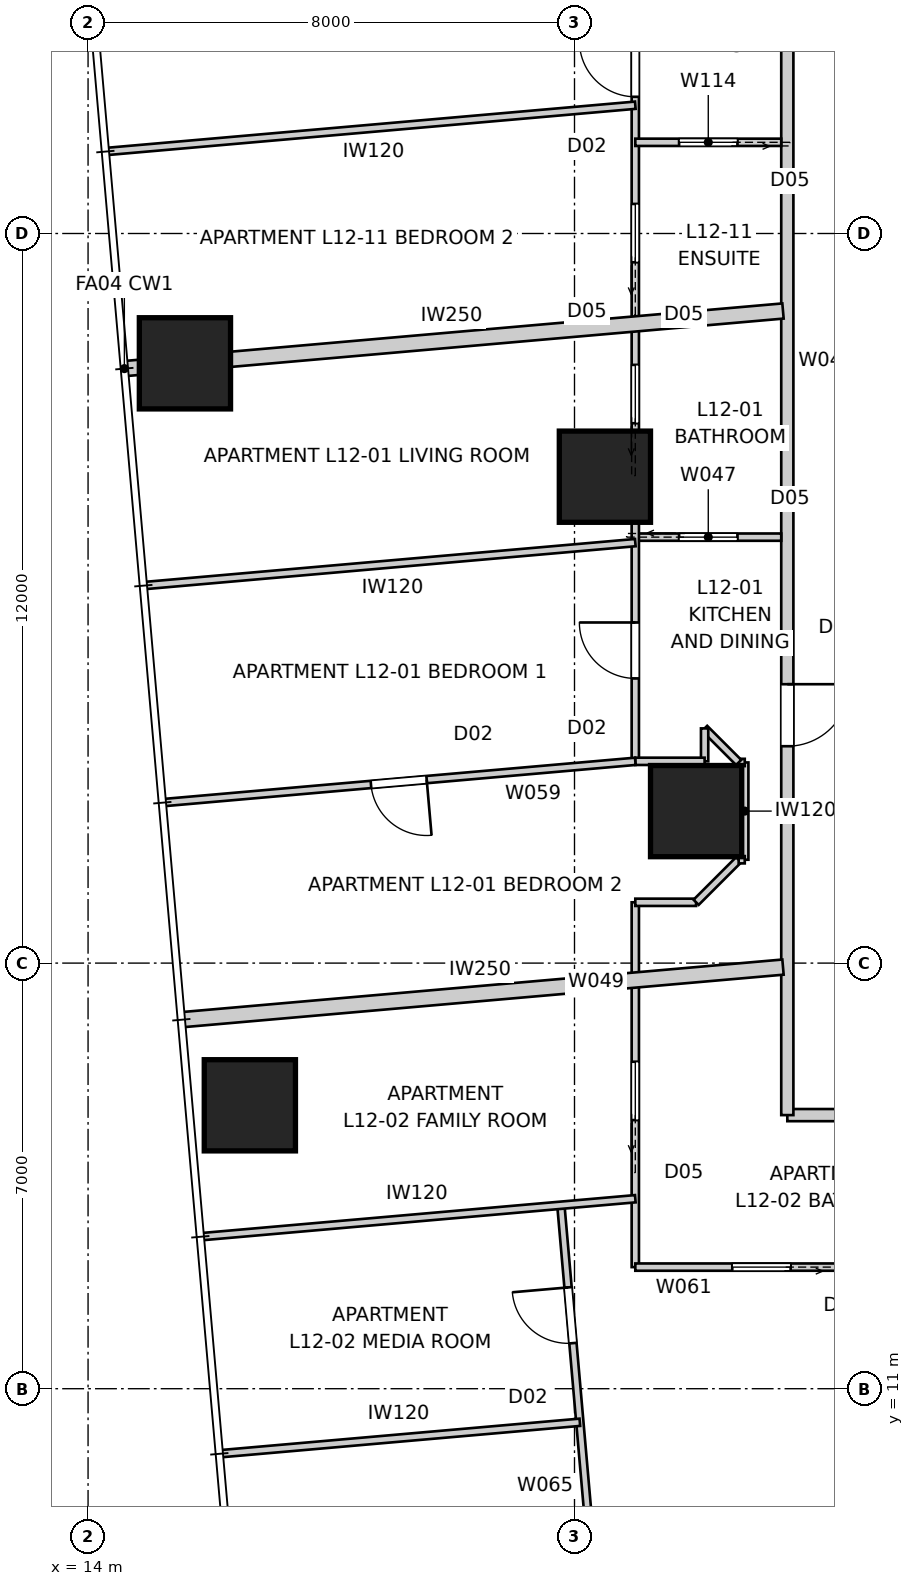
"""IFC4 building model, lengths in metres.
Left out: names, types, materials, properties, quantities, classifications, styles, units other than length and angle.
Written with IfcOpenShell. Run it as: python <this file> out.ifc"""

import sys

from ifc_helpers import new_model, si_unit, direction, frame, frame_2d, origin, origin_2d, place, context, subcontext, project, spatial, rectangle, extrude, element, fill, save


model = new_model("IFC4")
c1 = context("Model", 3, precision=1e-05, world=origin(), true_north=direction((0.0, 1.0)))
c2 = subcontext(c1, "Body", "Model", "MODEL_VIEW")
j1 = project(units=[si_unit("LENGTHUNIT", "METRE"), si_unit("PLANEANGLEUNIT", "RADIAN")], contexts=[c1])
p1 = place(None, origin())
s1 = spatial("IfcSite", under=j1, at=p1, CompositionType="ELEMENT")
p2 = place(p1, origin())
s2 = spatial("IfcBuilding", under=s1, at=p2, CompositionType="ELEMENT")
p3 = place(p2, frame((0.0, 0.0, 47.2)))
s3 = spatial("IfcBuildingStorey", under=s2, at=p3, CompositionType="ELEMENT", Elevation=47.2)
for number, where, z_axis, x_axis in (
    (1, (15.593, 27.865, -0.15), (0.0, 0.0, 1.0), (1.0, 0.0, 0.0)),
    (2, (16.661, 15.661, -0.15), (0.0, 0.0, 1.0), (1.0, 0.0, 0.0)),
):
    element("IfcColumn", number, at=place(p3, frame(where, z_axis=z_axis, x_axis=x_axis)), inside=s3, PredefinedType="COLUMN", context=c2, shape_type="SweptSolid", body=[
        extrude(rectangle(XDim=1.5, YDim=1.5, at=origin_2d()), origin(), (0.0, 0.0, 1.0), 3.55),
    ])
for number, where, z_axis, x_axis in (
    (3, (22.5, 26.0, 0.0), (0.0, 0.0, 1.0), (1.0, 0.0, 0.0)),
    (4, (24.0, 20.5, 0.0), (0.0, 0.0, 1.0), (1.0, 0.0, 0.0)),
):
    element("IfcColumn", number, at=place(p3, frame(where, z_axis=z_axis, x_axis=x_axis)), inside=s3, PredefinedType="COLUMN", context=c2, shape_type="SweptSolid", body=[
        extrude(rectangle(XDim=1.5, YDim=1.5, at=origin_2d()), origin(), (0.0, 0.0, 1.0), 3.4),
    ])
p4 = place(p3, frame((25.5, 15.5, 0.0), z_axis=(0.0, 0.0, 1.0), x_axis=(1.0, 0.0, 0.0)))
e5 = element("IfcWall", 5, at=p4, inside=s3, PredefinedType="PARTITIONING", context=c2, shape_type="SweptSolid", body=[
    extrude(rectangle(XDim=28.2, YDim=0.2, at=frame_2d((14.1, 0.0))), origin(), (0.0, 0.0, 1.0), 3.25),
])
p5 = place(p4, frame((19.123, 0.0, 0.0)))
e6 = element("IfcOpeningElement", 6, at=p5, cuts=e5, PredefinedType="OPENING", context=c2, shape_type="SweptSolid", body=[
    extrude(rectangle(XDim=1.02, YDim=2.34, at=frame_2d((0.51, 1.17))), frame((0.0, 0.11, 0.0), z_axis=(0.0, -1.0, 0.0), x_axis=(1.0, 0.0, 0.0)), (0.0, 0.0, 1.0), 0.22),
])
p6 = place(p4, frame((5.85, 0.0, 0.0)))
e7 = element("IfcOpeningElement", 7, at=p6, cuts=e5, PredefinedType="OPENING", context=c2, shape_type="SweptSolid", body=[
    extrude(rectangle(XDim=1.02, YDim=2.34, at=frame_2d((0.51, 1.17))), frame((0.0, 0.11, 0.0), z_axis=(0.0, -1.0, 0.0), x_axis=(1.0, 0.0, 0.0)), (0.0, 0.0, 1.0), 0.22),
])
p7 = place(p4, frame((24.892, 0.0, 0.0)))
e8 = element("IfcOpeningElement", 8, at=p7, cuts=e5, PredefinedType="OPENING", context=c2, shape_type="SweptSolid", body=[
    extrude(rectangle(XDim=1.02, YDim=2.1, at=frame_2d((0.51, 1.05))), frame((0.0, 0.11, 0.0), z_axis=(0.0, -1.0, 0.0), x_axis=(1.0, 0.0, 0.0)), (0.0, 0.0, 1.0), 0.22),
])
p8 = place(p3, frame((25.5, 43.7, 0.0), z_axis=(0.0, 0.0, 1.0), x_axis=(0.0, -1.0, 0.0)))
e9 = element("IfcWall", 9, at=p8, inside=s3, PredefinedType="PARTITIONING", context=c2, shape_type="SweptSolid", body=[
    extrude(rectangle(XDim=28.2, YDim=0.2, at=frame_2d((14.1, 0.0))), origin(), (0.0, 0.0, 1.0), 3.25),
])
p9 = place(p8, frame((21.113, 0.0, 0.0)))
e10 = element("IfcOpeningElement", 10, at=p9, cuts=e9, PredefinedType="OPENING", context=c2, shape_type="SweptSolid", body=[
    extrude(rectangle(XDim=1.02, YDim=2.34, at=frame_2d((0.51, 1.17))), frame((0.0, 0.11, 0.0), z_axis=(0.0, -1.0, 0.0), x_axis=(1.0, 0.0, 0.0)), (0.0, 0.0, 1.0), 0.22),
])
p10 = place(p8, frame((9.457, 0.0, 0.0)))
e11 = element("IfcOpeningElement", 11, at=p10, cuts=e9, PredefinedType="OPENING", context=c2, shape_type="SweptSolid", body=[
    extrude(rectangle(XDim=1.02, YDim=2.34, at=frame_2d((0.51, 1.17))), frame((0.0, 0.11, 0.0), z_axis=(0.0, -1.0, 0.0), x_axis=(1.0, 0.0, 0.0)), (0.0, 0.0, 1.0), 0.22),
])
p11 = place(p3, frame((15.534, 17.068, 0.0), z_axis=(0.0, 0.0, 1.0), x_axis=(0.996194517831, 0.087157803114, 0.0)))
e12 = element("IfcWall", 12, at=p11, inside=s3, PredefinedType="PARTITIONING", context=c2, shape_type="SweptSolid", body=[
    extrude(rectangle(XDim=9.933, YDim=0.25, at=frame_2d((4.966, 0.0))), origin(), (0.0, 0.0, 1.0), 3.25),
])
p12 = place(p3, frame((14.597, 27.778, 0.0), z_axis=(0.0, 0.0, 1.0), x_axis=(0.996196056792, 0.087140211333, 0.0)))
e13 = element("IfcWall", 13, at=p12, inside=s3, PredefinedType="PARTITIONING", context=c2, shape_type="SweptSolid", body=[
    extrude(rectangle(XDim=10.873, YDim=0.25, at=frame_2d((5.437, 0.0))), origin(), (0.0, 0.0, 1.0), 3.25),
])
p13 = place(p3, frame((23.0, 25.006, 0.0), z_axis=(0.0, 0.0, 1.0), x_axis=(1.0, 0.0, 0.0)))
e14 = element("IfcWall", 14, at=p13, inside=s3, PredefinedType="PARTITIONING", context=c2, shape_type="SweptSolid", body=[
    extrude(rectangle(XDim=2.4, YDim=0.12, at=frame_2d((1.2, 0.0))), origin(), (0.0, 0.0, 1.0), 3.25),
])
p14 = place(p13, frame((0.72, 0.0, 0.0)))
e15 = element("IfcOpeningElement", 15, at=p14, cuts=e14, PredefinedType="OPENING", context=c2, shape_type="SweptSolid", body=[
    extrude(rectangle(XDim=0.96, YDim=2.1, at=frame_2d((0.48, 1.05))), frame((0.0, 0.07, 0.0), z_axis=(0.0, -1.0, 0.0), x_axis=(1.0, 0.0, 0.0)), (0.0, 0.0, 1.0), 0.14),
])
p15 = place(p3, frame((23.0, 21.319, 0.0), z_axis=(0.0, 0.0, 1.0), x_axis=(0.0, 1.0, 0.0)))
e16 = element("IfcWall", 16, at=p15, inside=s3, PredefinedType="PARTITIONING", context=c2, shape_type="SweptSolid", body=[
    extrude(rectangle(XDim=25.681, YDim=0.12, at=frame_2d((12.841, 0.0))), origin(), (0.0, 0.0, 1.0), 2.55),
])
p16 = place(p15, frame((1.364, 0.0, 0.0)))
e17 = element("IfcOpeningElement", 17, at=p16, cuts=e16, PredefinedType="OPENING", context=c2, shape_type="SweptSolid", body=[
    extrude(rectangle(XDim=0.92, YDim=2.34, at=frame_2d((0.46, 1.17))), frame((0.0, 0.07, 0.0), z_axis=(0.0, -1.0, 0.0), x_axis=(1.0, 0.0, 0.0)), (0.0, 0.0, 1.0), 0.14),
])
p17 = place(p15, frame((10.93, 0.0, 0.0)))
e18 = element("IfcOpeningElement", 18, at=p17, cuts=e16, PredefinedType="OPENING", context=c2, shape_type="SweptSolid", body=[
    extrude(rectangle(XDim=0.92, YDim=2.34, at=frame_2d((0.46, 1.17))), frame((0.0, 0.07, 0.0), z_axis=(0.0, -1.0, 0.0), x_axis=(1.0, 0.0, 0.0)), (0.0, 0.0, 1.0), 0.14),
])
p18 = place(p15, frame((22.233, 0.0, 0.0)))
e19 = element("IfcOpeningElement", 19, at=p18, cuts=e16, PredefinedType="OPENING", context=c2, shape_type="SweptSolid", body=[
    extrude(rectangle(XDim=0.92, YDim=2.34, at=frame_2d((0.46, 1.17))), frame((0.0, 0.07, 0.0), z_axis=(0.0, -1.0, 0.0), x_axis=(1.0, 0.0, 0.0)), (0.0, 0.0, 1.0), 0.14),
])
p19 = place(p15, frame((18.991, 0.0, 0.0)))
e20 = element("IfcOpeningElement", 20, at=p19, cuts=e16, PredefinedType="OPENING", context=c2, shape_type="SweptSolid", body=[
    extrude(rectangle(XDim=0.96, YDim=2.1, at=frame_2d((0.48, 1.05))), frame((0.0, 0.07, 0.0), z_axis=(0.0, -1.0, 0.0), x_axis=(1.0, 0.0, 0.0)), (0.0, 0.0, 1.0), 0.14),
])
p20 = place(p15, frame((5.561, 0.0, 0.0)))
e21 = element("IfcOpeningElement", 21, at=p20, cuts=e16, PredefinedType="OPENING", context=c2, shape_type="SweptSolid", body=[
    extrude(rectangle(XDim=0.96, YDim=2.1, at=frame_2d((0.48, 1.05))), frame((0.0, 0.07, 0.0), z_axis=(0.0, -1.0, 0.0), x_axis=(1.0, 0.0, 0.0)), (0.0, 0.0, 1.0), 0.14),
])
p21 = place(p15, frame((15.836, 0.0, 0.0)))
e22 = element("IfcOpeningElement", 22, at=p21, cuts=e16, PredefinedType="OPENING", context=c2, shape_type="SweptSolid", body=[
    extrude(rectangle(XDim=0.96, YDim=2.1, at=frame_2d((0.48, 1.05))), frame((0.0, 0.07, 0.0), z_axis=(0.0, -1.0, 0.0), x_axis=(1.0, 0.0, 0.0)), (0.0, 0.0, 1.0), 0.14),
])
p22 = place(p15, frame((8.208, 0.0, 0.0)))
e23 = element("IfcOpeningElement", 23, at=p22, cuts=e16, PredefinedType="OPENING", context=c2, shape_type="SweptSolid", body=[
    extrude(rectangle(XDim=0.96, YDim=2.1, at=frame_2d((0.48, 1.05))), frame((0.0, 0.07, 0.0), z_axis=(0.0, -1.0, 0.0), x_axis=(1.0, 0.0, 0.0)), (0.0, 0.0, 1.0), 0.14),
])
p23 = place(p3, frame((23.0, 13.0, 0.0), z_axis=(0.0, 0.0, 1.0), x_axis=(0.0, 1.0, 0.0)))
e24 = element("IfcWall", 24, at=p23, inside=s3, PredefinedType="PARTITIONING", context=c2, shape_type="SweptSolid", body=[
    extrude(rectangle(XDim=6.0, YDim=0.12, at=frame_2d((3.0, 0.0))), origin(), (0.0, 0.0, 1.0), 3.25),
])
p24 = place(p23, frame((2.418, 0.0, 0.0)))
e25 = element("IfcOpeningElement", 25, at=p24, cuts=e24, PredefinedType="OPENING", context=c2, shape_type="SweptSolid", body=[
    extrude(rectangle(XDim=0.96, YDim=2.1, at=frame_2d((0.48, 1.05))), frame((0.0, 0.07, 0.0), z_axis=(0.0, -1.0, 0.0), x_axis=(1.0, 0.0, 0.0)), (0.0, 0.0, 1.0), 0.14),
])
p25 = place(p3, frame((23.0, 19.0, 0.0), z_axis=(0.0, 0.0, 1.0), x_axis=(1.0, 0.0, 0.0)))
e26 = element("IfcWall", 26, at=p25, inside=s3, PredefinedType="PARTITIONING", context=c2, shape_type="SweptSolid", body=[
    extrude(rectangle(XDim=1.0, YDim=0.12, at=frame_2d((0.5, 0.0))), origin(), (0.0, 0.0, 1.0), 3.25),
])
p26 = place(p3, frame((24.0, 19.0, 0.0), z_axis=(0.0, 0.0, 1.0), x_axis=(0.707106781187, 0.707106781187, 0.0)))
e27 = element("IfcWall", 27, at=p26, inside=s3, PredefinedType="PARTITIONING", context=c2, shape_type="SweptSolid", body=[
    extrude(rectangle(XDim=0.99, YDim=0.12, at=frame_2d((0.495, 0.0))), origin(), (0.0, 0.0, 1.0), 3.25),
])
p27 = place(p3, frame((24.8, 19.7, 0.0), z_axis=(0.0, 0.0, 1.0), x_axis=(0.0, 1.0, 0.0)))
e28 = element("IfcWall", 28, at=p27, inside=s3, PredefinedType="PARTITIONING", context=c2, shape_type="SweptSolid", body=[
    extrude(rectangle(XDim=1.6, YDim=0.12, at=frame_2d((0.8, 0.0))), origin(), (0.0, 0.0, 1.0), 3.25),
])
p28 = place(p3, frame((24.7, 21.3, 0.0), z_axis=(0.0, 0.0, 1.0), x_axis=(-0.707106781187, 0.707106781187, 0.0)))
e29 = element("IfcWall", 29, at=p28, inside=s3, PredefinedType="PARTITIONING", context=c2, shape_type="SweptSolid", body=[
    extrude(rectangle(XDim=0.792, YDim=0.12, at=frame_2d((0.396, 0.0))), origin(), (0.0, 0.0, 1.0), 3.25),
])
p29 = place(p3, frame((24.14, 21.86, 0.0), z_axis=(0.0, 0.0, 1.0), x_axis=(0.0, -1.0, 0.0)))
e30 = element("IfcWall", 30, at=p29, inside=s3, PredefinedType="PARTITIONING", context=c2, shape_type="SweptSolid", body=[
    extrude(rectangle(XDim=0.542, YDim=0.12, at=frame_2d((0.271, 0.0))), origin(), (0.0, 0.0, 1.0), 3.25),
])
p30 = place(p3, frame((24.14, 21.319, 0.0), z_axis=(0.0, 0.0, 1.0), x_axis=(-1.0, 0.0, 0.0)))
e31 = element("IfcWall", 31, at=p30, inside=s3, PredefinedType="PARTITIONING", context=c2, shape_type="SweptSolid", body=[
    extrude(rectangle(XDim=1.14, YDim=0.12, at=frame_2d((0.57, 0.0))), origin(), (0.0, 0.0, 1.0), 3.25),
])
p31 = place(p3, frame((23.0, 24.916, 0.0), z_axis=(0.0, 0.0, 1.0), x_axis=(-0.99619214338, -0.087184938313, 0.0)))
e32 = element("IfcWall", 32, at=p31, inside=s3, PredefinedType="PARTITIONING", context=c2, shape_type="SweptSolid", body=[
    extrude(rectangle(XDim=8.082, YDim=0.12, at=frame_2d((4.041, 0.0))), origin(), (0.0, 0.0, 1.0), 3.25),
])
p32 = place(p3, frame((23.0, 21.319, 0.0), z_axis=(0.0, 0.0, 1.0), x_axis=(-0.996195047824, -0.0871517452, 0.0)))
e33 = element("IfcWall", 33, at=p32, inside=s3, PredefinedType="PARTITIONING", context=c2, shape_type="SweptSolid", body=[
    extrude(rectangle(XDim=7.768, YDim=0.12, at=frame_2d((3.884, 0.0))), origin(), (0.0, 0.0, 1.0), 3.25),
])
p33 = place(p32, frame((3.444, 0.0, 0.0)))
e34 = element("IfcOpeningElement", 34, at=p33, cuts=e33, PredefinedType="OPENING", context=c2, shape_type="SweptSolid", body=[
    extrude(rectangle(XDim=0.92, YDim=2.34, at=frame_2d((0.46, 1.17))), frame((0.0, 0.07, 0.0), z_axis=(0.0, -1.0, 0.0), x_axis=(1.0, 0.0, 0.0)), (0.0, 0.0, 1.0), 0.14),
])
p34 = place(p3, frame((29.0, 13.0, 0.0), z_axis=(0.0, 0.0, 1.0), x_axis=(-1.0, 0.0, 0.0)))
e35 = element("IfcWall", 35, at=p34, inside=s3, PredefinedType="PARTITIONING", context=c2, shape_type="SweptSolid", body=[
    extrude(rectangle(XDim=6.0, YDim=0.12, at=frame_2d((3.0, 0.0))), origin(), (0.0, 0.0, 1.0), 3.25),
])
p35 = place(p34, frame((3.445, 0.0, 0.0)))
e36 = element("IfcOpeningElement", 36, at=p35, cuts=e35, PredefinedType="OPENING", context=c2, shape_type="SweptSolid", body=[
    extrude(rectangle(XDim=0.96, YDim=2.1, at=frame_2d((0.48, 1.05))), frame((0.0, 0.07, 0.0), z_axis=(0.0, -1.0, 0.0), x_axis=(1.0, 0.0, 0.0)), (0.0, 0.0, 1.0), 0.14),
])
p36 = place(p34, frame((0.769, 0.0, 0.0)))
e37 = element("IfcOpeningElement", 37, at=p36, cuts=e35, PredefinedType="OPENING", context=c2, shape_type="SweptSolid", body=[
    extrude(rectangle(XDim=0.96, YDim=2.1, at=frame_2d((0.48, 1.05))), frame((0.0, 0.07, 0.0), z_axis=(0.0, -1.0, 0.0), x_axis=(1.0, 0.0, 0.0)), (0.0, 0.0, 1.0), 0.14),
])
p37 = place(p3, frame((22.745, 2.933, 0.0), z_axis=(0.0, 0.0, 1.0), x_axis=(-0.087152252187, 0.99619500347, 0.0)))
e38 = element("IfcWall", 38, at=p37, inside=s3, PredefinedType="PARTITIONING", context=c2, shape_type="SweptSolid", body=[
    extrude(rectangle(XDim=11.127, YDim=0.12, at=frame_2d((5.563, 0.0))), origin(), (0.0, 0.0, 1.0), 3.25),
])
p38 = place(p37, frame((3.317, 0.0, 0.0)))
e39 = element("IfcOpeningElement", 39, at=p38, cuts=e38, PredefinedType="OPENING", context=c2, shape_type="SweptSolid", body=[
    extrude(rectangle(XDim=0.92, YDim=2.34, at=frame_2d((0.46, 1.17))), frame((0.0, 0.07, 0.0), z_axis=(0.0, -1.0, 0.0), x_axis=(1.0, 0.0, 0.0)), (0.0, 0.0, 1.0), 0.14),
])
p39 = place(p37, frame((8.85, 0.0, 0.0)))
e40 = element("IfcOpeningElement", 40, at=p39, cuts=e38, PredefinedType="OPENING", context=c2, shape_type="SweptSolid", body=[
    extrude(rectangle(XDim=0.92, YDim=2.34, at=frame_2d((0.46, 1.17))), frame((0.0, 0.07, 0.0), z_axis=(0.0, -1.0, 0.0), x_axis=(1.0, 0.0, 0.0)), (0.0, 0.0, 1.0), 0.14),
])
p40 = place(p3, frame((15.886, 13.502, 0.0), z_axis=(0.0, 0.0, 1.0), x_axis=(0.996195424363, 0.087147441029, 0.0)))
e41 = element("IfcWall", 41, at=p40, inside=s3, PredefinedType="PARTITIONING", context=c2, shape_type="SweptSolid", body=[
    extrude(rectangle(XDim=7.141, YDim=0.12, at=frame_2d((3.57, 0.0))), origin(), (0.0, 0.0, 1.0), 2.638),
])
p41 = place(p3, frame((16.198, 9.933, 0.0), z_axis=(0.0, 0.0, 1.0), x_axis=(0.996196451325, 0.087135700879, 0.0)))
e42 = element("IfcWall", 42, at=p41, inside=s3, PredefinedType="PARTITIONING", context=c2, shape_type="SweptSolid", body=[
    extrude(rectangle(XDim=5.912, YDim=0.12, at=frame_2d((2.956, 0.0))), origin(), (0.0, 0.0, 1.0), 3.25),
])
p42 = place(p3, frame((25.4, 31.5, 0.0), z_axis=(0.0, 0.0, 1.0), x_axis=(-1.0, 0.0, 0.0)))
e43 = element("IfcWall", 43, at=p42, inside=s3, PredefinedType="PARTITIONING", context=c2, shape_type="SweptSolid", body=[
    extrude(rectangle(XDim=2.4, YDim=0.12, at=frame_2d((1.2, 0.0))), origin(), (0.0, 0.0, 1.0), 3.25),
])
p43 = place(p42, frame((0.72, 0.0, 0.0)))
e44 = element("IfcOpeningElement", 44, at=p43, cuts=e43, PredefinedType="OPENING", context=c2, shape_type="SweptSolid", body=[
    extrude(rectangle(XDim=0.96, YDim=2.1, at=frame_2d((0.48, 1.05))), frame((0.0, 0.07, 0.0), z_axis=(0.0, -1.0, 0.0), x_axis=(1.0, 0.0, 0.0)), (0.0, 0.0, 1.0), 0.14),
])
p44 = place(p3, frame((23.0, 32.11, 0.0), z_axis=(0.0, 0.0, 1.0), x_axis=(-0.996194478193, -0.087158256162, 0.0)))
e45 = element("IfcWall", 45, at=p44, inside=s3, PredefinedType="PARTITIONING", context=c2, shape_type="SweptSolid", body=[
    extrude(rectangle(XDim=8.709, YDim=0.12, at=frame_2d((4.354, 0.0))), origin(), (0.0, 0.0, 1.0), 3.25),
])
for number, where, z_axis, x_axis in (
    (46, (24.8, 19.7, 0.0), (0.0, 0.0, 1.0), (-1.0, 0.0, 0.0)),
    (47, (24.8, 21.3, 0.0), (0.0, 0.0, 1.0), (-1.0, 0.0, 0.0)),
):
    element("IfcWall", number, at=place(p3, frame(where, z_axis=z_axis, x_axis=x_axis)), inside=s3, PredefinedType="PARTITIONING", context=c2, shape_type="SweptSolid", body=[
        extrude(rectangle(XDim=0.1, YDim=0.12, at=frame_2d((0.05, 0.0))), origin(), (0.0, 0.0, 1.0), 3.25),
    ])
p45 = place(p9, origin())
e48 = element("IfcDoor", 48, at=p45, inside=s3, OperationType="SINGLE_SWING_LEFT", PredefinedType="DOOR", context=c2, shape_type="SweptSolid", body=[
    extrude(rectangle(XDim=1.02, YDim=2.34, at=frame_2d((0.51, 1.17))), frame((0.0, 0.025, 0.0), z_axis=(0.0, -1.0, 0.0), x_axis=(1.0, 0.0, 0.0)), (0.0, 0.0, 1.0), 0.05),
])
fill(e10, e48)
p46 = place(p16, origin())
e49 = element("IfcDoor", 49, at=p46, inside=s3, OperationType="SINGLE_SWING_RIGHT", PredefinedType="DOOR", context=c2, shape_type="SweptSolid", body=[
    extrude(rectangle(XDim=0.92, YDim=2.34, at=frame_2d((0.46, 1.17))), frame((0.0, 0.025, 0.0), z_axis=(0.0, -1.0, 0.0), x_axis=(1.0, 0.0, 0.0)), (0.0, 0.0, 1.0), 0.05),
])
fill(e17, e49)
p47 = place(p14, origin())
e50 = element("IfcDoor", 50, at=p47, inside=s3, OperationType="SLIDING_TO_LEFT", PredefinedType="DOOR", context=c2, shape_type="SweptSolid", body=[
    extrude(rectangle(XDim=0.96, YDim=2.1, at=frame_2d((0.48, 1.05))), frame((0.0, 0.025, 0.0), z_axis=(0.0, -1.0, 0.0), x_axis=(1.0, 0.0, 0.0)), (0.0, 0.0, 1.0), 0.05),
])
fill(e15, e50)
p48 = place(p17, origin())
e51 = element("IfcDoor", 51, at=p48, inside=s3, OperationType="SINGLE_SWING_RIGHT", PredefinedType="DOOR", context=c2, shape_type="SweptSolid", body=[
    extrude(rectangle(XDim=0.92, YDim=2.34, at=frame_2d((0.46, 1.17))), frame((0.0, 0.025, 0.0), z_axis=(0.0, -1.0, 0.0), x_axis=(1.0, 0.0, 0.0)), (0.0, 0.0, 1.0), 0.05),
])
fill(e18, e51)
p49 = place(p43, origin())
e52 = element("IfcDoor", 52, at=p49, inside=s3, OperationType="SLIDING_TO_LEFT", PredefinedType="DOOR", context=c2, shape_type="SweptSolid", body=[
    extrude(rectangle(XDim=0.96, YDim=2.1, at=frame_2d((0.48, 1.05))), frame((0.0, 0.025, 0.0), z_axis=(0.0, -1.0, 0.0), x_axis=(1.0, 0.0, 0.0)), (0.0, 0.0, 1.0), 0.05),
])
fill(e44, e52)
p50 = place(p20, origin())
e53 = element("IfcDoor", 53, at=p50, inside=s3, OperationType="SLIDING_TO_LEFT", PredefinedType="DOOR", context=c2, shape_type="SweptSolid", body=[
    extrude(rectangle(XDim=0.96, YDim=2.1, at=frame_2d((0.48, 1.05))), frame((0.0, 0.025, 0.0), z_axis=(0.0, -1.0, 0.0), x_axis=(1.0, 0.0, 0.0)), (0.0, 0.0, 1.0), 0.05),
])
fill(e21, e53)
p51 = place(p35, origin())
e54 = element("IfcDoor", 54, at=p51, inside=s3, OperationType="SLIDING_TO_LEFT", PredefinedType="DOOR", context=c2, shape_type="SweptSolid", body=[
    extrude(rectangle(XDim=0.96, YDim=2.1, at=frame_2d((0.48, 1.05))), frame((0.0, 0.025, 0.0), z_axis=(0.0, -1.0, 0.0), x_axis=(1.0, 0.0, 0.0)), (0.0, 0.0, 1.0), 0.05),
])
fill(e36, e54)
p52 = place(p24, origin())
e55 = element("IfcDoor", 55, at=p52, inside=s3, OperationType="SLIDING_TO_LEFT", PredefinedType="DOOR", context=c2, shape_type="SweptSolid", body=[
    extrude(rectangle(XDim=0.96, YDim=2.1, at=frame_2d((0.48, 1.05))), frame((0.0, 0.025, 0.0), z_axis=(0.0, -1.0, 0.0), x_axis=(1.0, 0.0, 0.0)), (0.0, 0.0, 1.0), 0.05),
])
fill(e25, e55)
p53 = place(p22, origin())
e56 = element("IfcDoor", 56, at=p53, inside=s3, OperationType="SLIDING_TO_LEFT", PredefinedType="DOOR", context=c2, shape_type="SweptSolid", body=[
    extrude(rectangle(XDim=0.96, YDim=2.1, at=frame_2d((0.48, 1.05))), frame((0.0, 0.025, 0.0), z_axis=(0.0, -1.0, 0.0), x_axis=(1.0, 0.0, 0.0)), (0.0, 0.0, 1.0), 0.05),
])
fill(e23, e56)
p54 = place(p39, origin())
e57 = element("IfcDoor", 57, at=p54, inside=s3, OperationType="SINGLE_SWING_RIGHT", PredefinedType="DOOR", context=c2, shape_type="SweptSolid", body=[
    extrude(rectangle(XDim=0.92, YDim=2.34, at=frame_2d((0.46, 1.17))), frame((0.0, 0.025, 0.0), z_axis=(0.0, -1.0, 0.0), x_axis=(1.0, 0.0, 0.0)), (0.0, 0.0, 1.0), 0.05),
])
fill(e40, e57)
p55 = place(p33, origin())
e58 = element("IfcDoor", 58, at=p55, inside=s3, OperationType="SINGLE_SWING_LEFT", PredefinedType="DOOR", context=c2, shape_type="SweptSolid", body=[
    extrude(rectangle(XDim=0.92, YDim=2.34, at=frame_2d((0.46, 1.17))), frame((0.0, 0.025, 0.0), z_axis=(0.0, -1.0, 0.0), x_axis=(1.0, 0.0, 0.0)), (0.0, 0.0, 1.0), 0.05),
])
fill(e34, e58)
save(model, sys.argv[1])
